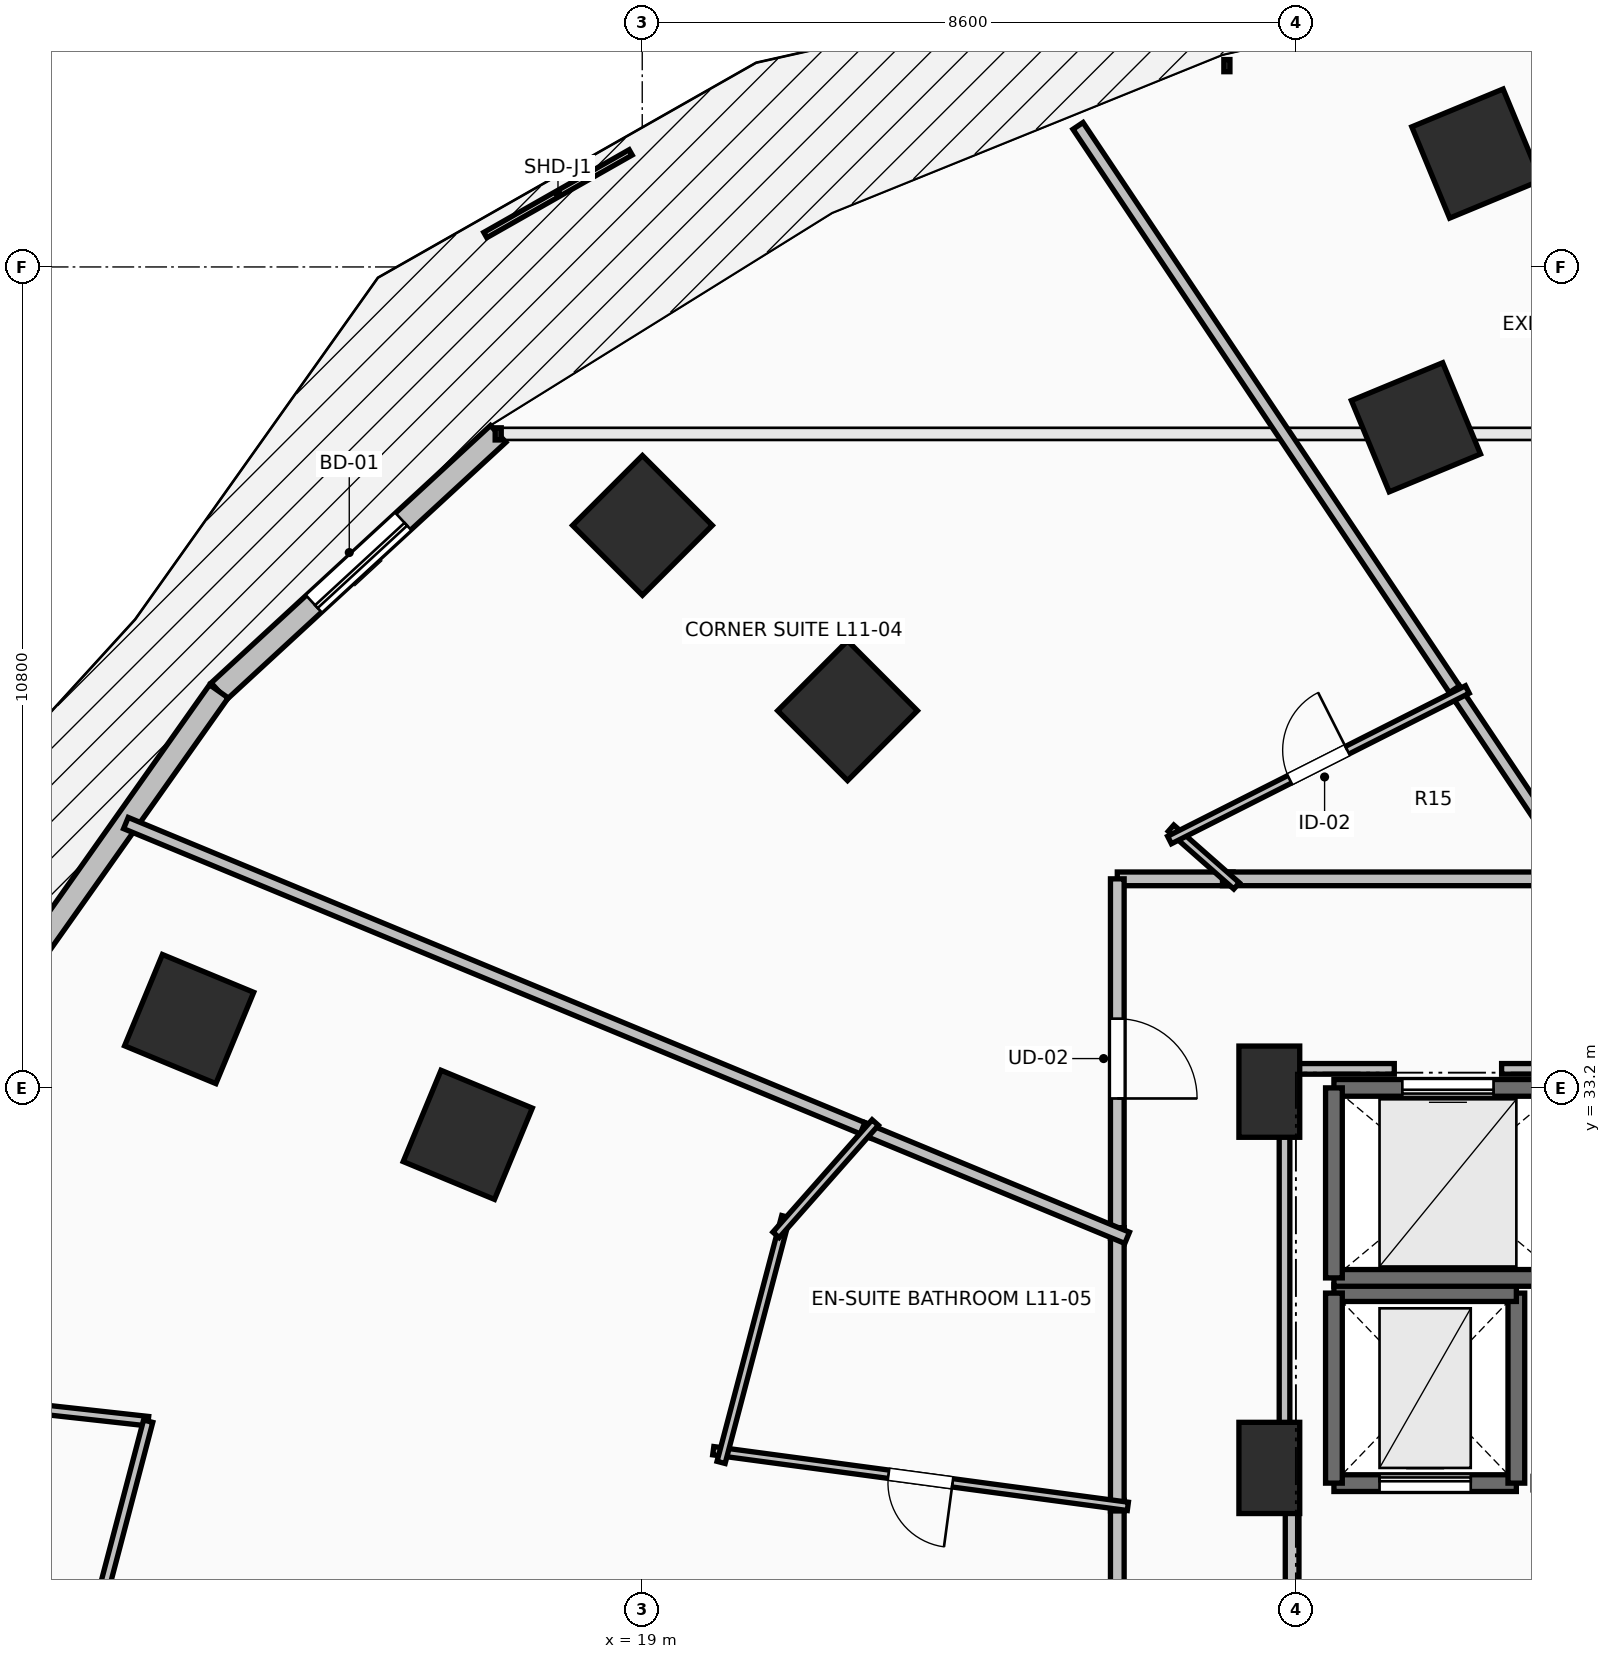
"""IFC4 building model, lengths in metres.
Left out: names, types, materials, properties, quantities, classifications, styles, units other than length and angle.
Written with IfcOpenShell. Run it as: python <this file> out.ifc"""

import sys

from ifc_helpers import new_model, si_unit, direction, frame, frame_2d, origin, origin_2d, place, context, subcontext, project, spatial, rectangle, extrude, element, fill, save


model = new_model("IFC4")
c1 = context("Model", 3, precision=1e-05, world=origin(), true_north=direction((0.0, 1.0)))
c2 = subcontext(c1, "Body", "Model", "MODEL_VIEW")
j1 = project(units=[si_unit("LENGTHUNIT", "METRE"), si_unit("PLANEANGLEUNIT", "RADIAN")], contexts=[c1])
p1 = place(None, origin())
s1 = spatial("IfcSite", under=j1, at=p1, CompositionType="ELEMENT")
p2 = place(p1, origin())
s2 = spatial("IfcBuilding", under=s1, at=p2, CompositionType="ELEMENT")
p3 = place(p2, frame((0.0, 0.0, 45.0)))
s3 = spatial("IfcBuildingStorey", under=s2, at=p3, CompositionType="ELEMENT", Elevation=45.0)
for number, where, z_axis, x_axis in (
    (1, (29.179, 41.891, 0.0), (0.0, 0.0, 1.0), (-0.383, 0.924, 0.0)),
    (2, (21.701, 38.162, 0.0), (0.0, 0.0, 1.0), (-0.707, 0.707, 0.0)),
    (3, (16.705, 32.582, 0.0), (0.0, 0.0, 1.0), (-0.924, 0.383, 0.0)),
    (4, (29.974, 45.492, 0.0), (0.0, 0.0, 1.0), (-0.383, 0.924, 0.0)),
    (5, (19.003, 40.6, 0.0), (0.0, 0.0, 1.0), (-0.707, 0.707, 0.0)),
    (6, (13.039, 34.105, 0.0), (0.0, 0.0, 1.0), (-0.924, 0.383, 0.0)),
):
    element("IfcColumn", number, at=place(p3, frame(where, z_axis=z_axis, x_axis=x_axis)), inside=s3, PredefinedType="COLUMN", context=c2, shape_type="SweptSolid", body=[
        extrude(rectangle(XDim=1.3, YDim=1.3, at=origin_2d()), origin(), (0.0, 0.0, 1.0), 3.5),
    ])
for number, where, z_axis, x_axis in (
    (7, (27.25, 28.2, 0.0), (0.0, 0.0, 1.0), (1.0, 0.0, 0.0)),
    (8, (27.25, 33.15, 0.0), (0.0, 0.0, 1.0), (1.0, 0.0, 0.0)),
):
    element("IfcColumn", number, at=place(p3, frame(where, z_axis=z_axis, x_axis=x_axis)), inside=s3, PredefinedType="PILASTER", context=c2, shape_type="SweptSolid", body=[
        extrude(rectangle(XDim=0.8, YDim=1.2, at=origin_2d()), origin(), (0.0, 0.0, 1.0), 3.5),
    ])
p4 = place(p3, frame((17.105, 41.804, 0.0), z_axis=(0.0, 0.0, 1.0), x_axis=(-0.735342629635, -0.677695519419, 0.0)))
e9 = element("IfcWall", 9, at=p4, inside=s3, PredefinedType="STANDARD", context=c2, shape_type="SweptSolid", body=[
    extrude(rectangle(XDim=4.997, YDim=0.3, at=frame_2d((2.499, 0.0))), origin(), (0.0, 0.0, 1.0), 3.24),
])
p5 = place(p4, frame((1.699, 0.0, 0.0)))
e10 = element("IfcOpeningElement", 10, at=p5, cuts=e9, PredefinedType="OPENING", context=c2, shape_type="SweptSolid", body=[
    extrude(rectangle(XDim=1.6, YDim=2.3, at=frame_2d((0.8, 1.15))), frame((0.0, 0.165, 0.0), z_axis=(0.0, -1.0, 0.0), x_axis=(1.0, 0.0, 0.0)), (0.0, 0.0, 1.0), 0.33),
])
p6 = place(p3, frame((13.43, 38.417, 0.0), z_axis=(0.0, 0.0, 1.0), x_axis=(-0.577130815624, -0.816651713803, 0.0)))
e11 = element("IfcWall", 11, at=p6, inside=s3, PredefinedType="STANDARD", context=c2, shape_type="SweptSolid", body=[
    extrude(rectangle(XDim=4.731, YDim=0.3, at=frame_2d((2.366, 0.0))), origin(), (0.0, 0.0, 1.0), 3.24),
])
p7 = place(p3, frame((28.1, 28.0, 0.0), z_axis=(0.0, 0.0, 1.0), x_axis=(1.0, 0.0, 0.0)))
e12 = element("IfcWall", 12, at=p7, inside=s3, PredefinedType="SHEAR", context=c2, shape_type="SweptSolid", body=[
    extrude(rectangle(XDim=2.4, YDim=0.22, at=frame_2d((1.2, 0.0))), origin(), (0.0, 0.0, 1.0), 3.24),
])
p8 = place(p7, frame((0.6, 0.0, 0.0)))
e13 = element("IfcOpeningElement", 13, at=p8, cuts=e12, PredefinedType="OPENING", context=c2, shape_type="SweptSolid", body=[
    extrude(rectangle(XDim=1.2, YDim=2.2, at=frame_2d((0.6, 1.1))), frame((0.0, 0.125, 0.0), z_axis=(0.0, -1.0, 0.0), x_axis=(1.0, 0.0, 0.0)), (0.0, 0.0, 1.0), 0.25),
])
p9 = place(p3, frame((30.5, 28.0, 0.0), z_axis=(0.0, 0.0, 1.0), x_axis=(0.0, 1.0, 0.0)))
e14 = element("IfcWall", 14, at=p9, inside=s3, PredefinedType="SHEAR", context=c2, shape_type="SweptSolid", body=[
    extrude(rectangle(XDim=2.5, YDim=0.22, at=frame_2d((1.25, 0.0))), origin(), (0.0, 0.0, 1.0), 3.24),
])
p10 = place(p3, frame((30.5, 30.5, 0.0), z_axis=(0.0, 0.0, 1.0), x_axis=(-1.0, 0.0, 0.0)))
e15 = element("IfcWall", 15, at=p10, inside=s3, PredefinedType="SHEAR", context=c2, shape_type="SweptSolid", body=[
    extrude(rectangle(XDim=2.4, YDim=0.22, at=frame_2d((1.2, 0.0))), origin(), (0.0, 0.0, 1.0), 3.24),
])
p11 = place(p3, frame((28.1, 30.5, 0.0), z_axis=(0.0, 0.0, 1.0), x_axis=(0.0, -1.0, 0.0)))
e16 = element("IfcWall", 16, at=p11, inside=s3, PredefinedType="SHEAR", context=c2, shape_type="SweptSolid", body=[
    extrude(rectangle(XDim=2.5, YDim=0.22, at=frame_2d((1.25, 0.0))), origin(), (0.0, 0.0, 1.0), 3.24),
])
p12 = place(p3, frame((28.1, 30.7, 0.0), z_axis=(0.0, 0.0, 1.0), x_axis=(1.0, 0.0, 0.0)))
e17 = element("IfcWall", 17, at=p12, inside=s3, PredefinedType="SOLIDWALL", context=c2, shape_type="SweptSolid", body=[
    extrude(rectangle(XDim=3.0, YDim=0.22, at=frame_2d((1.5, 0.0))), origin(), (0.0, 0.0, 1.0), 3.24),
])
p13 = place(p3, frame((31.1, 33.2, 0.0), z_axis=(0.0, 0.0, 1.0), x_axis=(-1.0, 0.0, 0.0)))
e18 = element("IfcWall", 18, at=p13, inside=s3, PredefinedType="SOLIDWALL", context=c2, shape_type="SweptSolid", body=[
    extrude(rectangle(XDim=3.0, YDim=0.22, at=frame_2d((1.5, 0.0))), origin(), (0.0, 0.0, 1.0), 3.24),
])
p14 = place(p13, frame((0.9, 0.0, 0.0)))
e19 = element("IfcOpeningElement", 19, at=p14, cuts=e18, PredefinedType="OPENING", context=c2, shape_type="SweptSolid", body=[
    extrude(rectangle(XDim=1.2, YDim=2.2, at=frame_2d((0.6, 1.1))), frame((0.0, 0.125, 0.0), z_axis=(0.0, -1.0, 0.0), x_axis=(1.0, 0.0, 0.0)), (0.0, 0.0, 1.0), 0.25),
])
p15 = place(p3, frame((28.1, 33.2, 0.0), z_axis=(0.0, 0.0, 1.0), x_axis=(0.0, -1.0, 0.0)))
e20 = element("IfcWall", 20, at=p15, inside=s3, PredefinedType="SOLIDWALL", context=c2, shape_type="SweptSolid", body=[
    extrude(rectangle(XDim=2.5, YDim=0.22, at=frame_2d((1.25, 0.0))), origin(), (0.0, 0.0, 1.0), 3.24),
])
p16 = place(p3, frame((27.55, 28.0, 0.0), z_axis=(0.0, 0.0, 1.0), x_axis=(0.0, -1.0, 0.0)))
e21 = element("IfcWall", 21, at=p16, inside=s3, PredefinedType="PARTITIONING", context=c2, shape_type="SweptSolid", body=[
    extrude(rectangle(XDim=4.05, YDim=0.18, at=frame_2d((2.025, 0.0))), origin(), (0.0, 0.0, 1.0), 3.24),
])
p17 = place(p16, frame((1.425, 0.0, 0.0)))
e22 = element("IfcOpeningElement", 22, at=p17, cuts=e21, PredefinedType="OPENING", context=c2, shape_type="SweptSolid", body=[
    extrude(rectangle(XDim=1.2, YDim=2.15, at=frame_2d((0.6, 1.075))), frame((0.0, 0.105, 0.0), z_axis=(0.0, -1.0, 0.0), x_axis=(1.0, 0.0, 0.0)), (0.0, 0.0, 1.0), 0.21),
])
p18 = place(p3, frame((26.774, 35.95, 0.0), z_axis=(0.0, 0.0, 1.0), x_axis=(-1.0, 0.0, 0.0)))
e23 = element("IfcWall", 23, at=p18, inside=s3, PredefinedType="PARTITIONING", context=c2, shape_type="SweptSolid", body=[
    extrude(rectangle(XDim=1.524, YDim=0.18, at=frame_2d((0.762, 0.0))), origin(), (0.0, 0.0, 1.0), 2.886),
])
p19 = place(p3, frame((25.25, 35.95, 0.0), z_axis=(0.0, 0.0, 1.0), x_axis=(0.0, -1.0, 0.0)))
e24 = element("IfcWall", 24, at=p19, inside=s3, PredefinedType="PARTITIONING", context=c2, shape_type="SweptSolid", body=[
    extrude(rectangle(XDim=4.729, YDim=0.18, at=frame_2d((2.365, 0.0))), origin(), (0.0, 0.0, 1.0), 2.432),
])
p20 = place(p19, frame((1.84, 0.0, 0.0)))
e25 = element("IfcOpeningElement", 25, at=p20, cuts=e24, PredefinedType="OPENING", context=c2, shape_type="SweptSolid", body=[
    extrude(rectangle(XDim=1.05, YDim=2.2, at=frame_2d((0.525, 1.1))), frame((0.0, 0.105, 0.0), z_axis=(0.0, -1.0, 0.0), x_axis=(1.0, 0.0, 0.0)), (0.0, 0.0, 1.0), 0.21),
])
p21 = place(p3, frame((31.42, 35.95, 0.0), z_axis=(0.0, 0.0, 1.0), x_axis=(-1.0, 0.0, 0.0)))
e26 = element("IfcWall", 26, at=p21, inside=s3, PredefinedType="PARTITIONING", context=c2, shape_type="SweptSolid", body=[
    extrude(rectangle(XDim=4.786, YDim=0.18, at=frame_2d((2.393, 0.0))), origin(), (0.0, 0.0, 1.0), 2.432),
])
p22 = place(p3, frame((25.25, 27.774, 0.0), z_axis=(0.0, 0.0, 1.0), x_axis=(0.0, -1.0, 0.0)))
e27 = element("IfcWall", 27, at=p22, inside=s3, PredefinedType="PARTITIONING", context=c2, shape_type="SweptSolid", body=[
    extrude(rectangle(XDim=4.371, YDim=0.18, at=frame_2d((2.186, 0.0))), origin(), (0.0, 0.0, 1.0), 2.432),
])
p23 = place(p22, frame((1.66, 0.0, 0.0)))
e28 = element("IfcOpeningElement", 28, at=p23, cuts=e27, PredefinedType="OPENING", context=c2, shape_type="SweptSolid", body=[
    extrude(rectangle(XDim=1.05, YDim=2.2, at=frame_2d((0.525, 1.1))), frame((0.0, 0.105, 0.0), z_axis=(0.0, -1.0, 0.0), x_axis=(1.0, 0.0, 0.0)), (0.0, 0.0, 1.0), 0.21),
])
p24 = place(p3, frame((25.25, 31.361, 0.0), z_axis=(0.0, 0.0, 1.0), x_axis=(0.0, -1.0, 0.0)))
e29 = element("IfcWall", 29, at=p24, inside=s3, PredefinedType="PARTITIONING", context=c2, shape_type="SweptSolid", body=[
    extrude(rectangle(XDim=3.727, YDim=0.18, at=frame_2d((1.864, 0.0))), origin(), (0.0, 0.0, 1.0), 2.432),
])
p25 = place(p3, frame((24.733, 45.856, 0.0), z_axis=(0.0, 0.0, 1.0), x_axis=(0.555564858458, -0.831473203444, 0.0)))
e30 = element("IfcWall", 30, at=p25, inside=s3, PredefinedType="PARTITIONING", context=c2, shape_type="SweptSolid", body=[
    extrude(rectangle(XDim=9.054, YDim=0.16, at=frame_2d((4.527, 0.0))), origin(), (0.0, 0.0, 1.0), 2.432),
])
p26 = place(p3, frame((29.685, 38.444, 0.0), z_axis=(0.0, 0.0, 1.0), x_axis=(0.555596981897, -0.831451738652, 0.0)))
e31 = element("IfcWall", 31, at=p26, inside=s3, PredefinedType="PARTITIONING", context=c2, shape_type="SweptSolid", body=[
    extrude(rectangle(XDim=3.14, YDim=0.16, at=frame_2d((1.57, 0.0))), origin(), (0.0, 0.0, 1.0), 2.432),
])
p27 = place(p3, frame((26.819, 35.857, 0.0), z_axis=(0.0, 0.0, 1.0), x_axis=(-0.750624975639, 0.660728496394, 0.0)))
e32 = element("IfcWall", 32, at=p27, inside=s3, PredefinedType="PARTITIONING", context=c2, shape_type="SweptSolid", body=[
    extrude(rectangle(XDim=1.149, YDim=0.11, at=frame_2d((0.574, 0.0))), origin(), (0.0, 0.0, 1.0), 2.886),
])
p28 = place(p3, frame((25.937, 36.461, 0.0), z_axis=(0.0, 0.0, 1.0), x_axis=(0.892461080662, 0.451124394711, 0.0)))
e33 = element("IfcWall", 33, at=p28, inside=s3, PredefinedType="PARTITIONING", context=c2, shape_type="SweptSolid", body=[
    extrude(rectangle(XDim=4.39, YDim=0.11, at=frame_2d((2.195, 0.0))), origin(), (0.0, 0.0, 1.0), 2.432),
])
p29 = place(p28, frame((1.77, 0.0, 0.0)))
e34 = element("IfcOpeningElement", 34, at=p29, cuts=e33, PredefinedType="OPENING", context=c2, shape_type="SweptSolid", body=[
    extrude(rectangle(XDim=0.85, YDim=2.1, at=frame_2d((0.425, 1.05))), frame((0.0, 0.07, 0.0), z_axis=(0.0, -1.0, 0.0), x_axis=(1.0, 0.0, 0.0)), (0.0, 0.0, 1.0), 0.14),
])
p30 = place(p3, frame((12.207, 36.684, 0.0), z_axis=(0.0, 0.0, 1.0), x_axis=(0.923876032578, -0.382691881842, 0.0)))
e35 = element("IfcWall", 35, at=p30, inside=s3, PredefinedType="PARTITIONING", context=c2, shape_type="SweptSolid", body=[
    extrude(rectangle(XDim=10.63, YDim=0.16, at=frame_2d((5.315, 0.0))), origin(), (0.0, 0.0, 1.0), 2.624),
])
p31 = place(p3, frame((21.899, 32.669, 0.0), z_axis=(0.0, 0.0, 1.0), x_axis=(0.923843852071, -0.382769561211, 0.0)))
e36 = element("IfcWall", 36, at=p31, inside=s3, PredefinedType="PARTITIONING", context=c2, shape_type="SweptSolid", body=[
    extrude(rectangle(XDim=3.768, YDim=0.16, at=frame_2d((1.884, 0.0))), origin(), (0.0, 0.0, 1.0), 2.886),
])
p32 = place(p3, frame((25.389, 27.694, 0.0), z_axis=(0.0, 0.0, 1.0), x_axis=(-0.991111683087, 0.133032445848, 0.0)))
e37 = element("IfcWall", 37, at=p32, inside=s3, PredefinedType="PARTITIONING", context=c2, shape_type="SweptSolid", body=[
    extrude(rectangle(XDim=5.504, YDim=0.11, at=frame_2d((2.752, 0.0))), origin(), (0.0, 0.0, 1.0), 2.432),
])
p33 = place(p32, frame((2.327, 0.0, 0.0)))
e38 = element("IfcOpeningElement", 38, at=p33, cuts=e37, PredefinedType="OPENING", context=c2, shape_type="SweptSolid", body=[
    extrude(rectangle(XDim=0.85, YDim=2.1, at=frame_2d((0.425, 1.05))), frame((0.0, 0.07, 0.0), z_axis=(0.0, -1.0, 0.0), x_axis=(1.0, 0.0, 0.0)), (0.0, 0.0, 1.0), 0.14),
])
p34 = place(p3, frame((20.037, 28.273, 0.0), z_axis=(0.0, 0.0, 1.0), x_axis=(0.254593926267, 0.967048050878, 0.0)))
e39 = element("IfcWall", 39, at=p34, inside=s3, PredefinedType="PARTITIONING", context=c2, shape_type="SweptSolid", body=[
    extrude(rectangle(XDim=3.344, YDim=0.11, at=frame_2d((1.672, 0.0))), origin(), (0.0, 0.0, 1.0), 2.432),
])
p35 = place(p3, frame((20.76, 31.266, 0.0), z_axis=(0.0, 0.0, 1.0), x_axis=(0.662047420969, 0.749461948593, 0.0)))
e40 = element("IfcWall", 40, at=p35, inside=s3, PredefinedType="PARTITIONING", context=c2, shape_type="SweptSolid", body=[
    extrude(rectangle(XDim=1.972, YDim=0.11, at=frame_2d((0.986, 0.0))), origin(), (0.0, 0.0, 1.0), 3.24),
])
p36 = place(p3, frame((8.869, 29.216, 0.0), z_axis=(0.0, 0.0, 1.0), x_axis=(0.99395362386, -0.109800699523, 0.0)))
e41 = element("IfcWall", 41, at=p36, inside=s3, PredefinedType="PARTITIONING", context=c2, shape_type="SweptSolid", body=[
    extrude(rectangle(XDim=3.653, YDim=0.125, at=frame_2d((1.827, 0.0))), origin(), (0.0, 0.0, 1.0), 2.624),
])
p37 = place(p3, frame((12.5, 28.815, 0.0), z_axis=(0.0, 0.0, 1.0), x_axis=(-0.254241432202, -0.967140783005, 0.0)))
e42 = element("IfcWall", 42, at=p37, inside=s3, PredefinedType="PARTITIONING", context=c2, shape_type="SweptSolid", body=[
    extrude(rectangle(XDim=2.911, YDim=0.125, at=frame_2d((1.455, 0.0))), origin(), (0.0, 0.0, 1.0), 3.24),
])
p38 = place(p3, frame((27.45, 28.196, 0.0), z_axis=(0.0, 0.0, 1.0), x_axis=(0.0, 1.0, 0.0)))
e43 = element("IfcWall", 43, at=p38, inside=s3, PredefinedType="PARTITIONING", context=c2, shape_type="SweptSolid", body=[
    extrude(rectangle(XDim=5.254, YDim=0.14, at=frame_2d((2.627, 0.0))), origin(), (0.0, 0.0, 1.0), 2.432),
])
p39 = place(p3, frame((27.45, 33.45, 0.0), z_axis=(0.0, 0.0, 1.0), x_axis=(1.0, 0.0, 0.0)))
e44 = element("IfcWall", 44, at=p39, inside=s3, PredefinedType="PARTITIONING", context=c2, shape_type="SweptSolid", body=[
    extrude(rectangle(XDim=1.444, YDim=0.14, at=frame_2d((0.722, 0.0))), origin(), (0.0, 0.0, 1.0), 2.432),
])
p40 = place(p3, frame((30.306, 33.45, 0.0), z_axis=(0.0, 0.0, 1.0), x_axis=(1.0, 0.0, 0.0)))
e45 = element("IfcWall", 45, at=p40, inside=s3, PredefinedType="PARTITIONING", context=c2, shape_type="SweptSolid", body=[
    extrude(rectangle(XDim=0.674, YDim=0.14, at=frame_2d((0.337, 0.0))), origin(), (0.0, 0.0, 1.0), 3.24),
])
p41 = place(p5, origin())
e46 = element("IfcDoor", 46, at=p41, inside=s3, OperationType="SLIDING_TO_LEFT", PredefinedType="DOOR", context=c2, shape_type="SweptSolid", body=[
    extrude(rectangle(XDim=1.6, YDim=2.3, at=frame_2d((0.8, 1.15))), frame((0.0, 0.025, 0.0), z_axis=(0.0, -1.0, 0.0), x_axis=(1.0, 0.0, 0.0)), (0.0, 0.0, 1.0), 0.05),
])
fill(e10, e46)
p42 = place(p8, origin())
e47 = element("IfcDoor", 47, at=p42, inside=s3, OperationType="SLIDING_TO_LEFT", PredefinedType="DOOR", context=c2, shape_type="SweptSolid", body=[
    extrude(rectangle(XDim=1.2, YDim=2.2, at=frame_2d((0.6, 1.1))), frame((0.0, 0.025, 0.0), z_axis=(0.0, -1.0, 0.0), x_axis=(1.0, 0.0, 0.0)), (0.0, 0.0, 1.0), 0.05),
])
fill(e13, e47)
p43 = place(p14, origin())
e48 = element("IfcDoor", 48, at=p43, inside=s3, OperationType="SLIDING_TO_LEFT", PredefinedType="DOOR", context=c2, shape_type="SweptSolid", body=[
    extrude(rectangle(XDim=1.2, YDim=2.2, at=frame_2d((0.6, 1.1))), frame((0.0, 0.025, 0.0), z_axis=(0.0, -1.0, 0.0), x_axis=(1.0, 0.0, 0.0)), (0.0, 0.0, 1.0), 0.05),
])
fill(e19, e48)
p44 = place(p20, origin())
e49 = element("IfcDoor", 49, at=p44, inside=s3, OperationType="SINGLE_SWING_RIGHT", PredefinedType="DOOR", context=c2, shape_type="SweptSolid", body=[
    extrude(rectangle(XDim=1.05, YDim=2.2, at=frame_2d((0.525, 1.1))), frame((0.0, 0.025, 0.0), z_axis=(0.0, -1.0, 0.0), x_axis=(1.0, 0.0, 0.0)), (0.0, 0.0, 1.0), 0.05),
])
fill(e25, e49)
p45 = place(p29, origin())
e50 = element("IfcDoor", 50, at=p45, inside=s3, OperationType="SINGLE_SWING_RIGHT", PredefinedType="DOOR", context=c2, shape_type="SweptSolid", body=[
    extrude(rectangle(XDim=0.85, YDim=2.1, at=frame_2d((0.425, 1.05))), frame((0.0, 0.025, 0.0), z_axis=(0.0, -1.0, 0.0), x_axis=(1.0, 0.0, 0.0)), (0.0, 0.0, 1.0), 0.05),
])
fill(e34, e50)
p46 = place(p33, origin())
e51 = element("IfcDoor", 51, at=p46, inside=s3, OperationType="SINGLE_SWING_LEFT", PredefinedType="DOOR", context=c2, shape_type="SweptSolid", body=[
    extrude(rectangle(XDim=0.85, YDim=2.1, at=frame_2d((0.425, 1.05))), frame((0.0, 0.025, 0.0), z_axis=(0.0, -1.0, 0.0), x_axis=(1.0, 0.0, 0.0)), (0.0, 0.0, 1.0), 0.05),
])
fill(e38, e51)
save(model, sys.argv[1])
